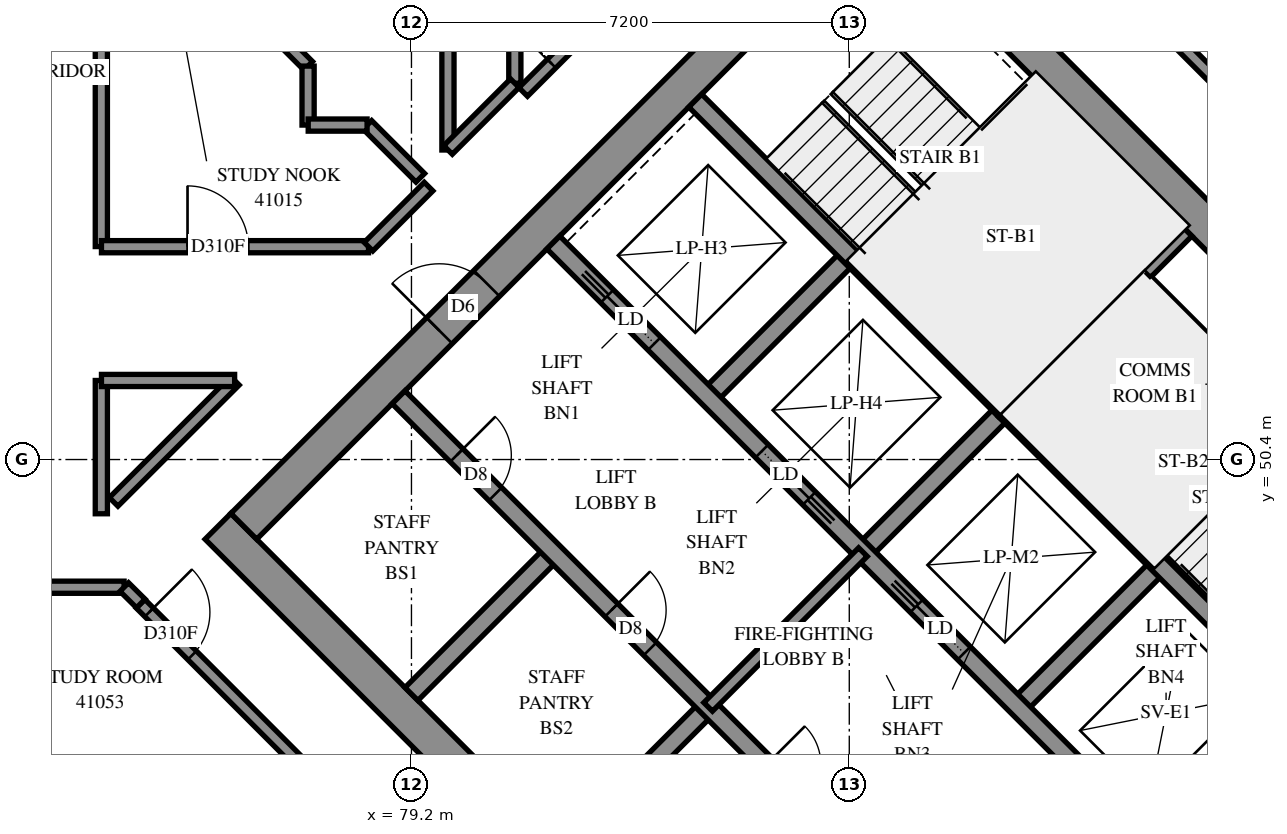
"""IFC4 building model, lengths in metres.
Left out: names, types, materials, properties, quantities, classifications, styles, units other than length and angle.
Written with IfcOpenShell. Run it as: python <this file> out.ifc"""

import sys

from ifc_helpers import new_model, si_unit, direction, frame, frame_2d, origin, place, context, subcontext, project, spatial, rectangle, extrude, element, fill, save


model = new_model("IFC4")
c1 = context("Model", 3, precision=1e-05, world=origin(), true_north=direction((0.0, 1.0)))
c2 = subcontext(c1, "Body", "Model", "MODEL_VIEW")
j1 = project(units=[si_unit("LENGTHUNIT", "METRE"), si_unit("PLANEANGLEUNIT", "RADIAN")], contexts=[c1])
p1 = place(None, origin())
s1 = spatial("IfcSite", under=j1, at=p1, CompositionType="ELEMENT")
p2 = place(p1, origin())
s2 = spatial("IfcBuilding", under=s1, at=p2, CompositionType="ELEMENT")
p3 = place(p2, frame((0.0, 0.0, 152.4)))
s3 = spatial("IfcBuildingStorey", under=s2, at=p3, CompositionType="ELEMENT", Elevation=152.4)
p4 = place(p3, frame((76.018, 49.302, -0.3), z_axis=(0.0, 0.0, 1.0), x_axis=(0.7071067812, -0.7071067812, 0.0)))
e1 = element("IfcWall", 1, at=p4, inside=s3, PredefinedType="SHEAR", context=c2, shape_type="SweptSolid", body=[
    extrude(rectangle(XDim=15.6, YDim=0.6, at=frame_2d((7.8, 0.0))), origin(), (0.0, 0.0, 1.0), 2.7),
])
p5 = place(p3, frame((86.625, 59.908, -0.3), z_axis=(0.0, 0.0, 1.0), x_axis=(0.7071067812, -0.7071067812, 0.0)))
e2 = element("IfcWall", 2, at=p5, inside=s3, PredefinedType="SHEAR", context=c2, shape_type="SweptSolid", body=[
    extrude(rectangle(XDim=15.6, YDim=0.6, at=frame_2d((7.8, 0.0))), origin(), (0.0, 0.0, 1.0), 2.7),
])
p6 = place(p5, frame((10.6, 0.0, 0.3)))
e3 = element("IfcOpeningElement", 3, at=p6, cuts=e2, PredefinedType="OPENING", context=c2, shape_type="SweptSolid", body=[
    extrude(rectangle(XDim=0.8, YDim=2.1, at=frame_2d((0.4, 1.05))), frame((0.0, 0.31, 0.0), z_axis=(0.0, -1.0, 0.0), x_axis=(1.0, 0.0, 0.0)), (0.0, 0.0, 1.0), 0.62),
])
p7 = place(p3, frame((76.442, 49.302, -0.3), z_axis=(0.0, 0.0, 1.0), x_axis=(0.7071067812, 0.7071067812, 0.0)))
e4 = element("IfcWall", 4, at=p7, inside=s3, PredefinedType="SHEAR", context=c2, shape_type="SweptSolid", body=[
    extrude(rectangle(XDim=14.4, YDim=0.6, at=frame_2d((7.2, 0.0))), origin(), (0.0, 0.0, 1.0), 2.7),
])
p8 = place(p7, frame((4.55, 0.0, 0.3)))
e5 = element("IfcOpeningElement", 5, at=p8, cuts=e4, PredefinedType="OPENING", context=c2, shape_type="SweptSolid", body=[
    extrude(rectangle(XDim=1.1, YDim=2.1, at=frame_2d((0.55, 1.05))), frame((0.0, 0.31, 0.0), z_axis=(0.0, -1.0, 0.0), x_axis=(1.0, 0.0, 0.0)), (0.0, 0.0, 1.0), 0.62),
])
p9 = place(p7, frame((11.35, 0.0, 0.3)))
e6 = element("IfcOpeningElement", 6, at=p9, cuts=e4, PredefinedType="OPENING", context=c2, shape_type="SweptSolid", body=[
    extrude(rectangle(XDim=1.1, YDim=2.1, at=frame_2d((0.55, 1.05))), frame((0.0, 0.31, 0.0), z_axis=(0.0, -1.0, 0.0), x_axis=(1.0, 0.0, 0.0)), (0.0, 0.0, 1.0), 0.62),
])
p10 = place(p3, frame((87.049, 38.695, -0.3), z_axis=(0.0, 0.0, 1.0), x_axis=(0.7071067812, 0.7071067812, 0.0)))
e7 = element("IfcWall", 7, at=p10, inside=s3, PredefinedType="SHEAR", context=c2, shape_type="SweptSolid", body=[
    extrude(rectangle(XDim=14.4, YDim=0.6, at=frame_2d((7.2, 0.0))), origin(), (0.0, 0.0, 1.0), 2.7),
])
p11 = place(p10, frame((4.55, 0.0, 0.3)))
e8 = element("IfcOpeningElement", 8, at=p11, cuts=e7, PredefinedType="OPENING", context=c2, shape_type="SweptSolid", body=[
    extrude(rectangle(XDim=1.1, YDim=2.1, at=frame_2d((0.55, 1.05))), frame((0.0, 0.31, 0.0), z_axis=(0.0, -1.0, 0.0), x_axis=(1.0, 0.0, 0.0)), (0.0, 0.0, 1.0), 0.62),
])
p12 = place(p10, frame((11.35, 0.0, 0.3)))
e9 = element("IfcOpeningElement", 9, at=p12, cuts=e7, PredefinedType="OPENING", context=c2, shape_type="SweptSolid", body=[
    extrude(rectangle(XDim=1.1, YDim=2.1, at=frame_2d((0.55, 1.05))), frame((0.0, 0.31, 0.0), z_axis=(0.0, -1.0, 0.0), x_axis=(1.0, 0.0, 0.0)), (0.0, 0.0, 1.0), 0.62),
])
for number, where, z_axis, x_axis in (
    (10, (79.2, 46.544, 0.0), (0.0, 0.0, 1.0), (0.707, 0.707, 0.0)),
    (11, (84.079, 51.423, 0.0), (0.0, 0.0, 1.0), (0.707, 0.707, 0.0)),
):
    element("IfcWall", number, at=place(p3, frame(where, z_axis=z_axis, x_axis=x_axis)), inside=s3, PredefinedType="SOLIDWALL", context=c2, shape_type="SweptSolid", body=[
        extrude(rectangle(XDim=3.3, YDim=0.3, at=frame_2d((1.65, 0.0))), origin(), (0.0, 0.0, 1.0), 3.1),
    ])
p13 = place(p3, frame((81.746, 43.999, 0.0), z_axis=(0.0, 0.0, 1.0), x_axis=(0.7071067812, 0.7071067812, 0.0)))
e12 = element("IfcWall", 12, at=p13, inside=s3, PredefinedType="SOLIDWALL", context=c2, shape_type="SweptSolid", body=[
    extrude(rectangle(XDim=3.3, YDim=0.3, at=frame_2d((1.65, 0.0))), origin(), (0.0, 0.0, 1.0), 3.1),
])
for number, where, z_axis, x_axis in (
    (13, (86.625, 48.878, 0.0), (0.0, 0.0, 1.0), (0.707, 0.707, 0.0)),
    (14, (89.17, 46.332, 0.0), (0.0, 0.0, 1.0), (0.707, 0.707, 0.0)),
):
    element("IfcWall", number, at=place(p3, frame(where, z_axis=z_axis, x_axis=x_axis)), inside=s3, PredefinedType="SOLIDWALL", context=c2, shape_type="SweptSolid", body=[
        extrude(rectangle(XDim=3.3, YDim=0.3, at=frame_2d((1.65, 0.0))), origin(), (0.0, 0.0, 1.0), 3.1),
    ])
p14 = place(p3, frame((78.988, 51.423, 0.0), z_axis=(0.0, 0.0, 1.0), x_axis=(0.7071067812, -0.7071067812, 0.0)))
e15 = element("IfcWall", 15, at=p14, inside=s3, PredefinedType="SOLIDWALL", context=c2, shape_type="SweptSolid", body=[
    extrude(rectangle(XDim=14.4, YDim=0.3, at=frame_2d((7.2, 0.0))), origin(), (0.0, 0.0, 1.0), 3.1),
])
p15 = place(p14, frame((1.35, 0.0, 0.0)))
e16 = element("IfcOpeningElement", 16, at=p15, cuts=e15, PredefinedType="OPENING", context=c2, shape_type="SweptSolid", body=[
    extrude(rectangle(XDim=0.9, YDim=2.1, at=frame_2d((0.45, 1.05))), frame((0.0, 0.16, 0.0), z_axis=(0.0, -1.0, 0.0), x_axis=(1.0, 0.0, 0.0)), (0.0, 0.0, 1.0), 0.32),
])
p16 = place(p14, frame((4.95, 0.0, 0.0)))
e17 = element("IfcOpeningElement", 17, at=p16, cuts=e15, PredefinedType="OPENING", context=c2, shape_type="SweptSolid", body=[
    extrude(rectangle(XDim=0.9, YDim=2.1, at=frame_2d((0.45, 1.05))), frame((0.0, 0.16, 0.0), z_axis=(0.0, -1.0, 0.0), x_axis=(1.0, 0.0, 0.0)), (0.0, 0.0, 1.0), 0.32),
])
p17 = place(p14, frame((8.55, 0.0, 0.0)))
e18 = element("IfcOpeningElement", 18, at=p17, cuts=e15, PredefinedType="OPENING", context=c2, shape_type="SweptSolid", body=[
    extrude(rectangle(XDim=0.9, YDim=2.1, at=frame_2d((0.45, 1.05))), frame((0.0, 0.16, 0.0), z_axis=(0.0, -1.0, 0.0), x_axis=(1.0, 0.0, 0.0)), (0.0, 0.0, 1.0), 0.32),
])
p18 = place(p14, frame((12.05, 0.0, 0.0)))
e19 = element("IfcOpeningElement", 19, at=p18, cuts=e15, PredefinedType="OPENING", context=c2, shape_type="SweptSolid", body=[
    extrude(rectangle(XDim=1.1, YDim=2.1, at=frame_2d((0.55, 1.05))), frame((0.0, 0.16, 0.0), z_axis=(0.0, -1.0, 0.0), x_axis=(1.0, 0.0, 0.0)), (0.0, 0.0, 1.0), 0.32),
])
p19 = place(p3, frame((81.534, 53.969, 0.0), z_axis=(0.0, 0.0, 1.0), x_axis=(0.707103309, -0.7071102534, 0.0)))
e20 = element("IfcWall", 20, at=p19, inside=s3, PredefinedType="SOLIDWALL", context=c2, shape_type="SweptSolid", body=[
    extrude(rectangle(XDim=14.4, YDim=0.3, at=frame_2d((7.2, 0.0))), origin(), (0.0, 0.0, 1.0), 3.1),
])
p20 = place(p19, frame((1.25, 0.0, 0.0)))
e21 = element("IfcOpeningElement", 21, at=p20, cuts=e20, PredefinedType="OPENING", context=c2, shape_type="SweptSolid", body=[
    extrude(rectangle(XDim=1.1, YDim=2.1, at=frame_2d((0.55, 1.05))), frame((0.0, 0.16, 0.0), z_axis=(0.0, -1.0, 0.0), x_axis=(1.0, 0.0, 0.0)), (0.0, 0.0, 1.0), 0.32),
])
p21 = place(p19, frame((4.85, 0.0, 0.0)))
e22 = element("IfcOpeningElement", 22, at=p21, cuts=e20, PredefinedType="OPENING", context=c2, shape_type="SweptSolid", body=[
    extrude(rectangle(XDim=1.1, YDim=2.1, at=frame_2d((0.55, 1.05))), frame((0.0, 0.16, 0.0), z_axis=(0.0, -1.0, 0.0), x_axis=(1.0, 0.0, 0.0)), (0.0, 0.0, 1.0), 0.32),
])
p22 = place(p19, frame((8.45, 0.0, 0.0)))
e23 = element("IfcOpeningElement", 23, at=p22, cuts=e20, PredefinedType="OPENING", context=c2, shape_type="SweptSolid", body=[
    extrude(rectangle(XDim=1.1, YDim=2.1, at=frame_2d((0.55, 1.05))), frame((0.0, 0.16, 0.0), z_axis=(0.0, -1.0, 0.0), x_axis=(1.0, 0.0, 0.0)), (0.0, 0.0, 1.0), 0.32),
])
p23 = place(p19, frame((12.05, 0.0, 0.0)))
e24 = element("IfcOpeningElement", 24, at=p23, cuts=e20, PredefinedType="OPENING", context=c2, shape_type="SweptSolid", body=[
    extrude(rectangle(XDim=1.1, YDim=2.1, at=frame_2d((0.55, 1.05))), frame((0.0, 0.16, 0.0), z_axis=(0.0, -1.0, 0.0), x_axis=(1.0, 0.0, 0.0)), (0.0, 0.0, 1.0), 0.32),
])
for number, where, z_axis, x_axis in (
    (25, (83.867, 56.302, 0.0), (0.0, 0.0, 1.0), (0.707, -0.707, 0.0)),
    (26, (88.958, 51.211, 0.0), (0.0, 0.0, 1.0), (0.707, -0.707, 0.0)),
):
    element("IfcWall", number, at=place(p3, frame(where, z_axis=z_axis, x_axis=x_axis)), inside=s3, PredefinedType="SOLIDWALL", context=c2, shape_type="SweptSolid", body=[
        extrude(rectangle(XDim=7.2, YDim=0.3, at=frame_2d((3.6, 0.0))), origin(), (0.0, 0.0, 1.0), 3.1),
    ])
p24 = place(p3, frame((88.958, 51.211, 0.0), z_axis=(0.0, 0.0, 1.0), x_axis=(0.7071067812, 0.7071067812, 0.0)))
e27 = element("IfcWall", 27, at=p24, inside=s3, PredefinedType="SOLIDWALL", context=c2, shape_type="SweptSolid", body=[
    extrude(rectangle(XDim=4.2, YDim=0.3, at=frame_2d((2.1, 0.0))), origin(), (0.0, 0.0, 1.0), 3.1),
])
p25 = place(p3, frame((91.313, 53.354, 0.0), z_axis=(0.0, 0.0, 1.0), x_axis=(0.7071067812, -0.7071067812, 0.0)))
e28 = element("IfcWall", 28, at=p25, inside=s3, PredefinedType="PARTITIONING", context=c2, shape_type="SweptSolid", body=[
    extrude(rectangle(XDim=5.95, YDim=0.15, at=frame_2d((2.975, 0.0))), origin(), (0.0, 0.0, 1.0), 3.1),
])
p26 = place(p3, frame((84.079, 46.332, 0.0), z_axis=(0.0, 0.0, 1.0), x_axis=(0.7071067812, 0.7071067812, 0.0)))
e29 = element("IfcWall", 29, at=p26, inside=s3, PredefinedType="PARTITIONING", context=c2, shape_type="SweptSolid", body=[
    extrude(rectangle(XDim=3.6, YDim=0.2, at=frame_2d((1.8, 0.0))), origin(), (0.0, 0.0, 1.0), 3.1),
])
p27 = place(p3, frame((55.5, 48.3, 0.0), z_axis=(0.0, 0.0, 1.0), x_axis=(1.0, 0.0, 0.0)))
e30 = element("IfcWall", 30, at=p27, inside=s3, PredefinedType="PARTITIONING", context=c2, shape_type="SweptSolid", body=[
    extrude(rectangle(XDim=18.974, YDim=0.2, at=frame_2d((9.487, 0.0))), origin(), (0.0, 0.0, 1.0), 3.1),
])
p28 = place(p27, frame((4.4, 0.0, 0.0)))
e31 = element("IfcOpeningElement", 31, at=p28, cuts=e30, PredefinedType="OPENING", context=c2, shape_type="SweptSolid", body=[
    extrude(rectangle(XDim=0.9, YDim=2.1, at=frame_2d((0.45, 1.05))), frame((0.0, 0.11, 0.0), z_axis=(0.0, -1.0, 0.0), x_axis=(1.0, 0.0, 0.0)), (0.0, 0.0, 1.0), 0.22),
])
p29 = place(p27, frame((6.1, 0.0, 0.0)))
e32 = element("IfcOpeningElement", 32, at=p29, cuts=e30, PredefinedType="OPENING", context=c2, shape_type="SweptSolid", body=[
    extrude(rectangle(XDim=0.9, YDim=2.1, at=frame_2d((0.45, 1.05))), frame((0.0, 0.11, 0.0), z_axis=(0.0, -1.0, 0.0), x_axis=(1.0, 0.0, 0.0)), (0.0, 0.0, 1.0), 0.22),
])
p30 = place(p27, frame((13.162, 0.0, 0.0)))
e33 = element("IfcOpeningElement", 33, at=p30, cuts=e30, PredefinedType="OPENING", context=c2, shape_type="SweptSolid", body=[
    extrude(rectangle(XDim=1.0, YDim=2.1, at=frame_2d((0.5, 1.05))), frame((0.0, 0.11, 0.0), z_axis=(0.0, -1.0, 0.0), x_axis=(1.0, 0.0, 0.0)), (0.0, 0.0, 1.0), 0.22),
])
p31 = place(p3, frame((91.755, 57.317, 0.0), z_axis=(0.0, 0.0, 1.0), x_axis=(0.7071067812, -0.7071067812, 0.0)))
e34 = element("IfcWall", 34, at=p31, inside=s3, PredefinedType="PARTITIONING", context=c2, shape_type="SweptSolid", body=[
    extrude(rectangle(XDim=11.639, YDim=0.2, at=frame_2d((5.819, 0.0))), origin(), (0.0, 0.0, 1.0), 3.1),
])
p32 = place(p3, frame((81.038, 56.444, 0.0), z_axis=(0.0, 0.0, 1.0), x_axis=(0.7071067812, 0.7071067812, 0.0)))
e35 = element("IfcWall", 35, at=p32, inside=s3, PredefinedType="PARTITIONING", context=c2, shape_type="SweptSolid", body=[
    extrude(rectangle(XDim=8.2, YDim=0.2, at=frame_2d((4.1, 0.0))), origin(), (0.0, 0.0, 1.0), 3.1),
])
p33 = place(p32, frame((0.66, 0.0, 0.0)))
e36 = element("IfcOpeningElement", 36, at=p33, cuts=e35, PredefinedType="OPENING", context=c2, shape_type="SweptSolid", body=[
    extrude(rectangle(XDim=1.0, YDim=2.1, at=frame_2d((0.5, 1.05))), frame((0.0, 0.11, 0.0), z_axis=(0.0, -1.0, 0.0), x_axis=(1.0, 0.0, 0.0)), (0.0, 0.0, 1.0), 0.22),
])
p34 = place(p3, frame((74.1, 53.902, 0.0), z_axis=(0.0, 0.0, 1.0), x_axis=(0.0, 1.0, 0.0)))
e37 = element("IfcWall", 37, at=p34, inside=s3, PredefinedType="PARTITIONING", context=c2, shape_type="SweptSolid", body=[
    extrude(rectangle(XDim=6.366, YDim=0.2, at=frame_2d((3.183, 0.0))), origin(), (0.0, 0.0, 1.0), 3.1),
])
p35 = place(p3, frame((74.745, 48.029, 0.0), z_axis=(0.0, 0.0, 1.0), x_axis=(0.7068806156, -0.7073328745, 0.0)))
e38 = element("IfcWall", 38, at=p35, inside=s3, PredefinedType="PARTITIONING", context=c2, shape_type="SweptSolid", body=[
    extrude(rectangle(XDim=4.422, YDim=0.2, at=frame_2d((2.211, 0.0))), origin(), (0.0, 0.0, 1.0), 3.1),
])
p36 = place(p35, frame((0.199, 0.0, 0.0)))
e39 = element("IfcOpeningElement", 39, at=p36, cuts=e38, PredefinedType="OPENING", context=c2, shape_type="SweptSolid", body=[
    extrude(rectangle(XDim=1.0, YDim=2.1, at=frame_2d((0.5, 1.05))), frame((0.0, 0.11, 0.0), z_axis=(0.0, -1.0, 0.0), x_axis=(1.0, 0.0, 0.0)), (0.0, 0.0, 1.0), 0.22),
])
p37 = place(p3, frame((74.102, 53.9, 0.0), z_axis=(0.0, 0.0, 1.0), x_axis=(1.0, 0.0, 0.0)))
e40 = element("IfcWall", 40, at=p37, inside=s3, PredefinedType="PARTITIONING", context=c2, shape_type="SweptSolid", body=[
    extrude(rectangle(XDim=4.392, YDim=0.2, at=frame_2d((2.196, 0.0))), origin(), (0.0, 0.0, 1.0), 3.1),
])
p38 = place(p37, frame((1.415, 0.0, 0.0)))
e41 = element("IfcOpeningElement", 41, at=p38, cuts=e40, PredefinedType="OPENING", context=c2, shape_type="SweptSolid", body=[
    extrude(rectangle(XDim=1.0, YDim=2.1, at=frame_2d((0.5, 1.05))), frame((0.0, 0.11, 0.0), z_axis=(0.0, -1.0, 0.0), x_axis=(1.0, 0.0, 0.0)), (0.0, 0.0, 1.0), 0.22),
])
p39 = place(p3, frame((79.8, 55.49, 0.0), z_axis=(0.0, 0.0, 1.0), x_axis=(0.0, 1.0, 0.0)))
e42 = element("IfcWall", 42, at=p39, inside=s3, PredefinedType="PARTITIONING", context=c2, shape_type="SweptSolid", body=[
    extrude(rectangle(XDim=3.81, YDim=0.2, at=frame_2d((1.905, 0.0))), origin(), (0.0, 0.0, 1.0), 3.1),
])
p40 = place(p3, frame((74.302, 49.704, 0.0), z_axis=(0.0, 0.0, 1.0), x_axis=(0.7074614873, 0.706751897, 0.0)))
e43 = element("IfcWall", 43, at=p40, inside=s3, PredefinedType="PARTITIONING", context=c2, shape_type="SweptSolid", body=[
    extrude(rectangle(XDim=2.818, YDim=0.2, at=frame_2d((1.409, 0.0))), origin(), (0.0, 0.0, 1.0), 3.1),
])
p41 = place(p3, frame((75.879, 58.497, 0.0), z_axis=(0.0, 0.0, 1.0), x_axis=(0.7075423257, -0.7066709682, 0.0)))
e44 = element("IfcWall", 44, at=p41, inside=s3, PredefinedType="PARTITIONING", context=c2, shape_type="SweptSolid", body=[
    extrude(rectangle(XDim=2.295, YDim=0.2, at=frame_2d((1.148, 0.0))), origin(), (0.0, 0.0, 1.0), 3.1),
])
p42 = place(p3, frame((74.1, 49.508, 0.0), z_axis=(0.0, 0.0, 1.0), x_axis=(0.0, 1.0, 0.0)))
e45 = element("IfcWall", 45, at=p42, inside=s3, PredefinedType="PARTITIONING", context=c2, shape_type="SweptSolid", body=[
    extrude(rectangle(XDim=2.192, YDim=0.2, at=frame_2d((1.096, 0.0))), origin(), (0.0, 0.0, 1.0), 3.1),
])
p43 = place(p3, frame((74.102, 51.7, 0.0), z_axis=(0.0, 0.0, 1.0), x_axis=(1.0, 0.0, 0.0)))
e46 = element("IfcWall", 46, at=p43, inside=s3, PredefinedType="PARTITIONING", context=c2, shape_type="SweptSolid", body=[
    extrude(rectangle(XDim=2.19, YDim=0.2, at=frame_2d((1.095, 0.0))), origin(), (0.0, 0.0, 1.0), 3.1),
])
p44 = place(p3, frame((80.9, 56.588, 0.0), z_axis=(0.0, 0.0, 1.0), x_axis=(0.0, 1.0, 0.0)))
e47 = element("IfcWall", 47, at=p44, inside=s3, PredefinedType="PARTITIONING", context=c2, shape_type="SweptSolid", body=[
    extrude(rectangle(XDim=1.838, YDim=0.2, at=frame_2d((0.919, 0.0))), origin(), (0.0, 0.0, 1.0), 3.1),
])
p45 = place(p3, frame((79.801, 55.491, 0.0), z_axis=(0.0, 0.0, 1.0), x_axis=(0.7071067812, 0.7071067812, 0.0)))
e48 = element("IfcWall", 48, at=p45, inside=s3, PredefinedType="PARTITIONING", context=c2, shape_type="SweptSolid", body=[
    extrude(rectangle(XDim=1.553, YDim=0.2, at=frame_2d((0.776, 0.0))), origin(), (0.0, 0.0, 1.0), 3.1),
])
p46 = place(p3, frame((78.494, 53.9, 0.0), z_axis=(0.0, 0.0, 1.0), x_axis=(0.7071067812, 0.7071067812, 0.0)))
e49 = element("IfcWall", 49, at=p46, inside=s3, PredefinedType="PARTITIONING", context=c2, shape_type="SweptSolid", body=[
    extrude(rectangle(XDim=1.397, YDim=0.2, at=frame_2d((0.699, 0.0))), origin(), (0.0, 0.0, 1.0), 3.1),
])
p47 = place(p3, frame((78.475, 55.903, 0.0), z_axis=(0.0, 0.0, 1.0), x_axis=(0.7071067812, -0.7071067812, 0.0)))
e50 = element("IfcWall", 50, at=p47, inside=s3, PredefinedType="PARTITIONING", context=c2, shape_type="SweptSolid", body=[
    extrude(rectangle(XDim=1.23, YDim=0.2, at=frame_2d((0.615, 0.0))), origin(), (0.0, 0.0, 1.0), 3.1),
])
p48 = place(p3, frame((77.5, 55.9, 0.0), z_axis=(0.0, 0.0, 1.0), x_axis=(0.0, 1.0, 0.0)))
e51 = element("IfcWall", 51, at=p48, inside=s3, PredefinedType="PARTITIONING", context=c2, shape_type="SweptSolid", body=[
    extrude(rectangle(XDim=0.97, YDim=0.2, at=frame_2d((0.485, 0.0))), origin(), (0.0, 0.0, 1.0), 3.1),
])
p49 = place(p3, frame((77.502, 55.9, 0.0), z_axis=(0.0, 0.0, 1.0), x_axis=(1.0, 0.0, 0.0)))
e52 = element("IfcWall", 52, at=p49, inside=s3, PredefinedType="PARTITIONING", context=c2, shape_type="SweptSolid", body=[
    extrude(rectangle(XDim=0.968, YDim=0.2, at=frame_2d((0.484, 0.0))), origin(), (0.0, 0.0, 1.0), 3.1),
])
p50 = place(p3, frame((74.477, 48.303, 0.0), z_axis=(0.0, 0.0, 1.0), x_axis=(0.7097111995, -0.7044927348, 0.0)))
e53 = element("IfcWall", 53, at=p50, inside=s3, PredefinedType="PARTITIONING", context=c2, shape_type="SweptSolid", body=[
    extrude(rectangle(XDim=0.383, YDim=0.2, at=frame_2d((0.192, 0.0))), origin(), (0.0, 0.0, 1.0), 3.1),
])
p51 = place(p8, origin())
e54 = element("IfcDoor", 54, at=p51, inside=s3, OperationType="DOUBLE_DOOR_SINGLE_SWING", PredefinedType="DOOR", context=c2, shape_type="SweptSolid", body=[
    extrude(rectangle(XDim=1.1, YDim=2.1, at=frame_2d((0.55, 1.05))), frame((0.0, 0.025, 0.0), z_axis=(0.0, -1.0, 0.0), x_axis=(1.0, 0.0, 0.0)), (0.0, 0.0, 1.0), 0.05),
])
fill(e5, e54)
p52 = place(p15, origin())
e55 = element("IfcDoor", 55, at=p52, inside=s3, OperationType="SINGLE_SWING_LEFT", PredefinedType="DOOR", context=c2, shape_type="SweptSolid", body=[
    extrude(rectangle(XDim=0.9, YDim=2.1, at=frame_2d((0.45, 1.05))), frame((0.0, 0.025, 0.0), z_axis=(0.0, -1.0, 0.0), x_axis=(1.0, 0.0, 0.0)), (0.0, 0.0, 1.0), 0.05),
])
fill(e16, e55)
p53 = place(p16, origin())
e56 = element("IfcDoor", 56, at=p53, inside=s3, OperationType="SINGLE_SWING_LEFT", PredefinedType="DOOR", context=c2, shape_type="SweptSolid", body=[
    extrude(rectangle(XDim=0.9, YDim=2.1, at=frame_2d((0.45, 1.05))), frame((0.0, 0.025, 0.0), z_axis=(0.0, -1.0, 0.0), x_axis=(1.0, 0.0, 0.0)), (0.0, 0.0, 1.0), 0.05),
])
fill(e17, e56)
p54 = place(p20, origin())
e57 = element("IfcDoor", 57, at=p54, inside=s3, OperationType="SLIDING_TO_LEFT", PredefinedType="DOOR", context=c2, shape_type="SweptSolid", body=[
    extrude(rectangle(XDim=1.1, YDim=2.1, at=frame_2d((0.55, 1.05))), frame((0.0, 0.025, 0.0), z_axis=(0.0, -1.0, 0.0), x_axis=(1.0, 0.0, 0.0)), (0.0, 0.0, 1.0), 0.05),
])
fill(e21, e57)
p55 = place(p21, origin())
e58 = element("IfcDoor", 58, at=p55, inside=s3, OperationType="SLIDING_TO_RIGHT", PredefinedType="DOOR", context=c2, shape_type="SweptSolid", body=[
    extrude(rectangle(XDim=1.1, YDim=2.1, at=frame_2d((0.55, 1.05))), frame((0.0, 0.025, 0.0), z_axis=(0.0, -1.0, 0.0), x_axis=(1.0, 0.0, 0.0)), (0.0, 0.0, 1.0), 0.05),
])
fill(e22, e58)
p56 = place(p22, origin())
e59 = element("IfcDoor", 59, at=p56, inside=s3, OperationType="SLIDING_TO_LEFT", PredefinedType="DOOR", context=c2, shape_type="SweptSolid", body=[
    extrude(rectangle(XDim=1.1, YDim=2.1, at=frame_2d((0.55, 1.05))), frame((0.0, 0.025, 0.0), z_axis=(0.0, -1.0, 0.0), x_axis=(1.0, 0.0, 0.0)), (0.0, 0.0, 1.0), 0.05),
])
fill(e23, e59)
p57 = place(p38, origin())
e60 = element("IfcDoor", 60, at=p57, inside=s3, OperationType="SINGLE_SWING_LEFT", PredefinedType="DOOR", context=c2, shape_type="SweptSolid", body=[
    extrude(rectangle(XDim=1.0, YDim=2.1, at=frame_2d((0.5, 1.05))), frame((0.0, 0.025, 0.0), z_axis=(0.0, -1.0, 0.0), x_axis=(1.0, 0.0, 0.0)), (0.0, 0.0, 1.0), 0.05),
])
fill(e41, e60)
p58 = place(p36, origin())
e61 = element("IfcDoor", 61, at=p58, inside=s3, OperationType="SINGLE_SWING_LEFT", PredefinedType="DOOR", context=c2, shape_type="SweptSolid", body=[
    extrude(rectangle(XDim=1.0, YDim=2.1, at=frame_2d((0.5, 1.05))), frame((0.0, 0.025, 0.0), z_axis=(0.0, -1.0, 0.0), x_axis=(1.0, 0.0, 0.0)), (0.0, 0.0, 1.0), 0.05),
])
fill(e39, e61)
p59 = place(p33, origin())
e62 = element("IfcDoor", 62, at=p59, inside=s3, OperationType="SINGLE_SWING_RIGHT", PredefinedType="DOOR", context=c2, shape_type="SweptSolid", body=[
    extrude(rectangle(XDim=1.0, YDim=2.1, at=frame_2d((0.5, 1.05))), frame((0.0, 0.025, 0.0), z_axis=(0.0, -1.0, 0.0), x_axis=(1.0, 0.0, 0.0)), (0.0, 0.0, 1.0), 0.05),
])
fill(e36, e62)
save(model, sys.argv[1])
